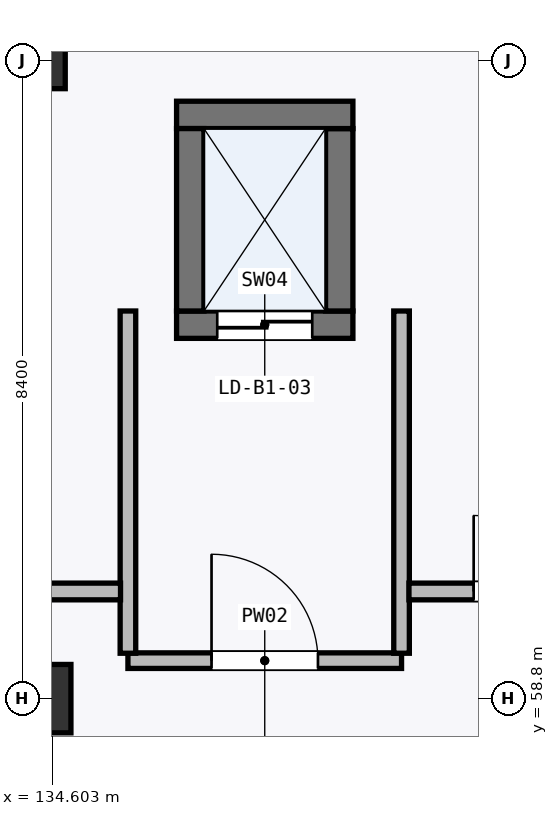
"""IFC4 building model, lengths in metres.
Left out: names, types, materials, properties, quantities, classifications, styles, units other than length and angle.
Written with IfcOpenShell. Run it as: python <this file> out.ifc"""

import sys

from ifc_helpers import new_model, si_unit, direction, frame, frame_2d, origin, origin_2d, place, context, subcontext, project, spatial, rectangle, hollow_rectangle, extrude, element, fill, save


model = new_model("IFC4")
c1 = context("Model", 3, precision=1e-05, world=origin(), true_north=direction((0.0, 1.0)))
c2 = subcontext(c1, "Body", "Model", "MODEL_VIEW")
j1 = project(units=[si_unit("LENGTHUNIT", "METRE"), si_unit("PLANEANGLEUNIT", "RADIAN")], contexts=[c1])
p1 = place(None, origin())
s1 = spatial("IfcSite", under=j1, at=p1, CompositionType="ELEMENT")
p2 = place(p1, origin())
s2 = spatial("IfcBuilding", under=s1, at=p2, CompositionType="ELEMENT")
p3 = place(p2, frame((0.0, 0.0, -5.4)))
s3 = spatial("IfcBuildingStorey", under=s2, at=p3, CompositionType="ELEMENT", Elevation=-5.4)
p4 = place(p3, frame((134.4, 58.8, 0.0), z_axis=(0.0, 0.0, 1.0), x_axis=(1.0, 0.0, 0.0)))
e1 = element("IfcColumn", 1, at=p4, inside=s3, PredefinedType="COLUMN", context=c2, shape_type="SweptSolid", body=[
    extrude(rectangle(XDim=0.9, YDim=0.9, at=origin_2d()), origin(), (0.0, 0.0, 1.0), 5.4),
])
p5 = place(p3, frame((134.4, 67.2, 0.0), z_axis=(0.0, 0.0, 1.0), x_axis=(1.0, 0.0, 0.0)))
e2 = element("IfcColumn", 2, at=p5, inside=s3, PredefinedType="COLUMN", context=c2, shape_type="SweptSolid", body=[
    extrude(hollow_rectangle(XDim=0.75, YDim=0.75, WallThickness=0.028, at=origin_2d()), origin(), (0.0, 0.0, 1.0), 5.4),
])
p6 = place(p3, frame((136.24, 63.72, 0.0), z_axis=(0.0, 0.0, 1.0), x_axis=(1.0, 0.0, 0.0)))
e3 = element("IfcWall", 3, at=p6, inside=s3, PredefinedType="SHEAR", context=c2, shape_type="SweptSolid", body=[
    extrude(rectangle(XDim=2.32, YDim=0.36, at=frame_2d((1.16, 0.0))), origin(), (0.0, 0.0, 1.0), 5.145),
])
p7 = place(p6, frame((0.535, 0.0, 0.0)))
e4 = element("IfcOpeningElement", 4, at=p7, cuts=e3, PredefinedType="OPENING", context=c2, shape_type="SweptSolid", body=[
    extrude(rectangle(XDim=1.25, YDim=2.2, at=frame_2d((0.625, 1.1))), frame((0.0, 0.19, 0.0), z_axis=(0.0, -1.0, 0.0), x_axis=(1.0, 0.0, 0.0)), (0.0, 0.0, 1.0), 0.38),
])
p8 = place(p3, frame((138.38, 63.9, 0.0), z_axis=(0.0, 0.0, 1.0), x_axis=(0.0, 1.0, 0.0)))
e5 = element("IfcWall", 5, at=p8, inside=s3, PredefinedType="SHEAR", context=c2, shape_type="SweptSolid", body=[
    extrude(rectangle(XDim=2.4, YDim=0.36, at=frame_2d((1.2, 0.0))), origin(), (0.0, 0.0, 1.0), 5.145),
])
p9 = place(p3, frame((138.56, 66.48, 0.0), z_axis=(0.0, 0.0, 1.0), x_axis=(-1.0, 0.0, 0.0)))
e6 = element("IfcWall", 6, at=p9, inside=s3, PredefinedType="SHEAR", context=c2, shape_type="SweptSolid", body=[
    extrude(rectangle(XDim=2.32, YDim=0.36, at=frame_2d((1.16, 0.0))), origin(), (0.0, 0.0, 1.0), 5.145),
])
p10 = place(p3, frame((136.42, 66.3, 0.0), z_axis=(0.0, 0.0, 1.0), x_axis=(0.0, -1.0, 0.0)))
e7 = element("IfcWall", 7, at=p10, inside=s3, PredefinedType="SHEAR", context=c2, shape_type="SweptSolid", body=[
    extrude(rectangle(XDim=2.4, YDim=0.36, at=frame_2d((1.2, 0.0))), origin(), (0.0, 0.0, 1.0), 5.145),
])
p11 = place(p3, frame((135.6, 59.3, 0.0), z_axis=(0.0, 0.0, 1.0), x_axis=(1.0, 0.0, 0.0)))
e8 = element("IfcWall", 8, at=p11, inside=s3, PredefinedType="PARTITIONING", context=c2, shape_type="SweptSolid", body=[
    extrude(rectangle(XDim=3.6, YDim=0.205, at=frame_2d((1.8, 0.0))), origin(), (0.0, 0.0, 1.0), 5.145),
])
p12 = place(p11, frame((1.1, 0.0, 0.0)))
e9 = element("IfcOpeningElement", 9, at=p12, cuts=e8, PredefinedType="OPENING", context=c2, shape_type="SweptSolid", body=[
    extrude(rectangle(XDim=1.4, YDim=2.15, at=frame_2d((0.7, 1.075))), frame((0.0, 0.113, 0.0), z_axis=(0.0, -1.0, 0.0), x_axis=(1.0, 0.0, 0.0)), (0.0, 0.0, 1.0), 0.225),
])
for number, where, z_axis, x_axis in (
    (10, (139.2, 59.397, 0.0), (0.0, 0.0, 1.0), (0.0, 1.0, 0.0)),
    (11, (135.6, 63.9, 0.0), (0.0, 0.0, 1.0), (0.0, -1.0, 0.0)),
):
    element("IfcWall", number, at=place(p3, frame(where, z_axis=z_axis, x_axis=x_axis)), inside=s3, PredefinedType="PARTITIONING", context=c2, shape_type="SweptSolid", body=[
        extrude(rectangle(XDim=4.502, YDim=0.205, at=frame_2d((2.251, 0.0))), origin(), (0.0, 0.0, 1.0), 5.145),
    ])
p13 = place(p3, frame((139.298, 60.21, 0.0), z_axis=(0.0, 0.0, 1.0), x_axis=(1.0, 0.0, 0.0)))
e12 = element("IfcWall", 12, at=p13, inside=s3, PredefinedType="PARTITIONING", context=c2, shape_type="SweptSolid", body=[
    extrude(rectangle(XDim=3.702, YDim=0.22, at=frame_2d((1.851, 0.0))), origin(), (0.0, 0.0, 1.0), 5.145),
])
p14 = place(p13, frame((0.851, 0.0, 0.0)))
e13 = element("IfcOpeningElement", 13, at=p14, cuts=e12, PredefinedType="OPENING", context=c2, shape_type="SweptSolid", body=[
    extrude(rectangle(XDim=2.0, YDim=2.2, at=frame_2d((1.0, 1.1))), frame((0.0, 0.12, 0.0), z_axis=(0.0, -1.0, 0.0), x_axis=(1.0, 0.0, 0.0)), (0.0, 0.0, 1.0), 0.24),
])
p15 = place(p3, frame((127.3, 60.21, 0.0), z_axis=(0.0, 0.0, 1.0), x_axis=(1.0, 0.0, 0.0)))
e14 = element("IfcWall", 14, at=p15, inside=s3, PredefinedType="PARTITIONING", context=c2, shape_type="SweptSolid", body=[
    extrude(rectangle(XDim=8.202, YDim=0.22, at=frame_2d((4.101, 0.0))), origin(), (0.0, 0.0, 1.0), 5.145),
])
p16 = place(p7, frame((1.25, 0.0, 0.0), z_axis=(0.0, 0.0, 1.0), x_axis=(-1.0, 0.0, 0.0)))
e15 = element("IfcDoor", 15, at=p16, inside=s3, OperationType="DOUBLE_DOOR_SLIDING", PredefinedType="DOOR", context=c2, shape_type="SweptSolid", body=[
    extrude(rectangle(XDim=1.25, YDim=2.2, at=frame_2d((0.625, 1.1))), frame((0.0, 0.025, 0.0), z_axis=(0.0, -1.0, 0.0), x_axis=(1.0, 0.0, 0.0)), (0.0, 0.0, 1.0), 0.05),
])
fill(e4, e15)
p17 = place(p12, origin())
e16 = element("IfcDoor", 16, at=p17, inside=s3, OperationType="SINGLE_SWING_LEFT", PredefinedType="DOOR", context=c2, shape_type="SweptSolid", body=[
    extrude(rectangle(XDim=1.4, YDim=2.15, at=frame_2d((0.7, 1.075))), frame((0.0, 0.025, 0.0), z_axis=(0.0, -1.0, 0.0), x_axis=(1.0, 0.0, 0.0)), (0.0, 0.0, 1.0), 0.05),
])
fill(e9, e16)
p18 = place(p14, origin())
e17 = element("IfcDoor", 17, at=p18, inside=s3, OperationType="DOUBLE_DOOR_SINGLE_SWING", PredefinedType="DOOR", context=c2, shape_type="SweptSolid", body=[
    extrude(rectangle(XDim=2.0, YDim=2.2, at=frame_2d((1.0, 1.1))), frame((0.0, 0.025, 0.0), z_axis=(0.0, -1.0, 0.0), x_axis=(1.0, 0.0, 0.0)), (0.0, 0.0, 1.0), 0.05),
])
fill(e13, e17)
save(model, sys.argv[1])
